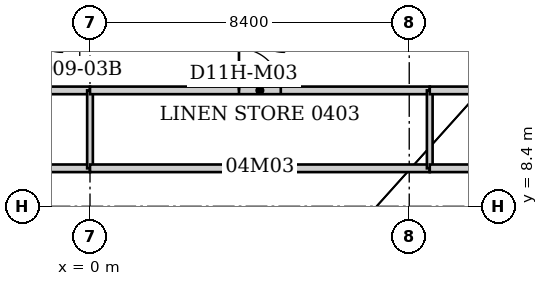
"""IFC4 building model, lengths in metres.
Left out: names, types, materials, properties, quantities, classifications, styles, units other than length and angle.
Written with IfcOpenShell. Run it as: python <this file> out.ifc"""

import sys

from ifc_helpers import new_model, si_unit, direction, frame, frame_2d, origin, place, context, subcontext, project, spatial, rectangle, extrude, element, fill, save


model = new_model("IFC4")
c1 = context("Model", 3, precision=1e-05, world=origin(), true_north=direction((0.0, 1.0)))
c2 = subcontext(c1, "Body", "Model", "MODEL_VIEW")
j1 = project(units=[si_unit("LENGTHUNIT", "METRE"), si_unit("PLANEANGLEUNIT", "RADIAN")], contexts=[c1])
p1 = place(None, origin())
s1 = spatial("IfcSite", under=j1, at=p1, CompositionType="ELEMENT")
p2 = place(p1, origin())
s2 = spatial("IfcBuilding", under=s1, at=p2, CompositionType="ELEMENT")
p3 = place(p2, frame((0.0, 0.0, 23.0)))
s3 = spatial("IfcBuildingStorey", under=s2, at=p3, CompositionType="ELEMENT", Elevation=23.0)
p4 = place(p3, frame((-8.94, 11.45, 0.0), z_axis=(0.0, 0.0, 1.0), x_axis=(1.0, 0.0, 0.0)))
e1 = element("IfcWall", 1, at=p4, inside=s3, PredefinedType="PARTITIONING", context=c2, shape_type="SweptSolid", body=[
    extrude(rectangle(XDim=8.94, YDim=0.2, at=frame_2d((4.47, 0.0))), origin(), (0.0, 0.0, 1.0), 3.64),
])
p5 = place(p4, frame((3.92, 0.0, 0.0)))
e2 = element("IfcOpeningElement", 2, at=p5, cuts=e1, PredefinedType="OPENING", context=c2, shape_type="SweptSolid", body=[
    extrude(rectangle(XDim=1.1, YDim=2.2, at=frame_2d((0.55, 1.1))), frame((0.0, 0.1, 0.0), z_axis=(0.0, -1.0, 0.0), x_axis=(1.0, 0.0, 0.0)), (0.0, 0.0, 1.0), 0.2),
])
p6 = place(p3, frame((0.0, 9.4, 0.0), z_axis=(0.0, 0.0, 1.0), x_axis=(-1.0, 0.0, 0.0)))
e3 = element("IfcWall", 3, at=p6, inside=s3, PredefinedType="PARTITIONING", context=c2, shape_type="SweptSolid", body=[
    extrude(rectangle(XDim=8.94, YDim=0.2, at=frame_2d((4.47, 0.0))), origin(), (0.0, 0.0, 1.0), 3.64),
])
p7 = place(p3, frame((0.0, 11.45, 0.0), z_axis=(0.0, 0.0, 1.0), x_axis=(0.0, -1.0, 0.0)))
e4 = element("IfcWall", 4, at=p7, inside=s3, PredefinedType="PARTITIONING", context=c2, shape_type="SweptSolid", body=[
    extrude(rectangle(XDim=2.05, YDim=0.15, at=frame_2d((1.025, 0.0))), origin(), (0.0, 0.0, 1.0), 2.878),
])
p8 = place(p3, frame((0.0, 11.45, 0.0), z_axis=(0.0, 0.0, 1.0), x_axis=(1.0, 0.0, 0.0)))
e5 = element("IfcWall", 5, at=p8, inside=s3, PredefinedType="PARTITIONING", context=c2, shape_type="SweptSolid", body=[
    extrude(rectangle(XDim=8.94, YDim=0.2, at=frame_2d((4.47, 0.0))), origin(), (0.0, 0.0, 1.0), 3.64),
])
p9 = place(p8, frame((3.92, 0.0, 0.0)))
e6 = element("IfcOpeningElement", 6, at=p9, cuts=e5, PredefinedType="OPENING", context=c2, shape_type="SweptSolid", body=[
    extrude(rectangle(XDim=1.1, YDim=2.2, at=frame_2d((0.55, 1.1))), frame((0.0, 0.1, 0.0), z_axis=(0.0, -1.0, 0.0), x_axis=(1.0, 0.0, 0.0)), (0.0, 0.0, 1.0), 0.2),
])
p10 = place(p3, frame((8.94, 9.4, 0.0), z_axis=(0.0, 0.0, 1.0), x_axis=(-1.0, 0.0, 0.0)))
e7 = element("IfcWall", 7, at=p10, inside=s3, PredefinedType="PARTITIONING", context=c2, shape_type="SweptSolid", body=[
    extrude(rectangle(XDim=8.94, YDim=0.2, at=frame_2d((4.47, 0.0))), origin(), (0.0, 0.0, 1.0), 3.64),
])
p11 = place(p3, frame((8.94, 11.45, 0.0), z_axis=(0.0, 0.0, 1.0), x_axis=(0.0, -1.0, 0.0)))
e8 = element("IfcWall", 8, at=p11, inside=s3, PredefinedType="PARTITIONING", context=c2, shape_type="SweptSolid", body=[
    extrude(rectangle(XDim=2.05, YDim=0.15, at=frame_2d((1.025, 0.0))), origin(), (0.0, 0.0, 1.0), 3.64),
])
p12 = place(p3, frame((8.94, 11.45, 0.0), z_axis=(0.0, 0.0, 1.0), x_axis=(1.0, 0.0, 0.0)))
e9 = element("IfcWall", 9, at=p12, inside=s3, PredefinedType="PARTITIONING", context=c2, shape_type="SweptSolid", body=[
    extrude(rectangle(XDim=4.67, YDim=0.2, at=frame_2d((2.335, 0.0))), origin(), (0.0, 0.0, 1.0), 3.64),
])
p13 = place(p3, frame((11.04, 9.4, 0.0), z_axis=(0.0, 0.0, 1.0), x_axis=(-1.0, 0.0, 0.0)))
e10 = element("IfcWall", 10, at=p13, inside=s3, PredefinedType="PARTITIONING", context=c2, shape_type="SweptSolid", body=[
    extrude(rectangle(XDim=2.1, YDim=0.2, at=frame_2d((1.05, 0.0))), origin(), (0.0, 0.0, 1.0), 3.64),
])
p14 = place(p9, origin())
e11 = element("IfcDoor", 11, at=p14, inside=s3, OperationType="SINGLE_SWING_LEFT", PredefinedType="DOOR", context=c2, shape_type="SweptSolid", body=[
    extrude(rectangle(XDim=1.1, YDim=2.2, at=frame_2d((0.55, 1.1))), frame((0.0, 0.025, 0.0), z_axis=(0.0, -1.0, 0.0), x_axis=(1.0, 0.0, 0.0)), (0.0, 0.0, 1.0), 0.05),
])
fill(e6, e11)
save(model, sys.argv[1])
